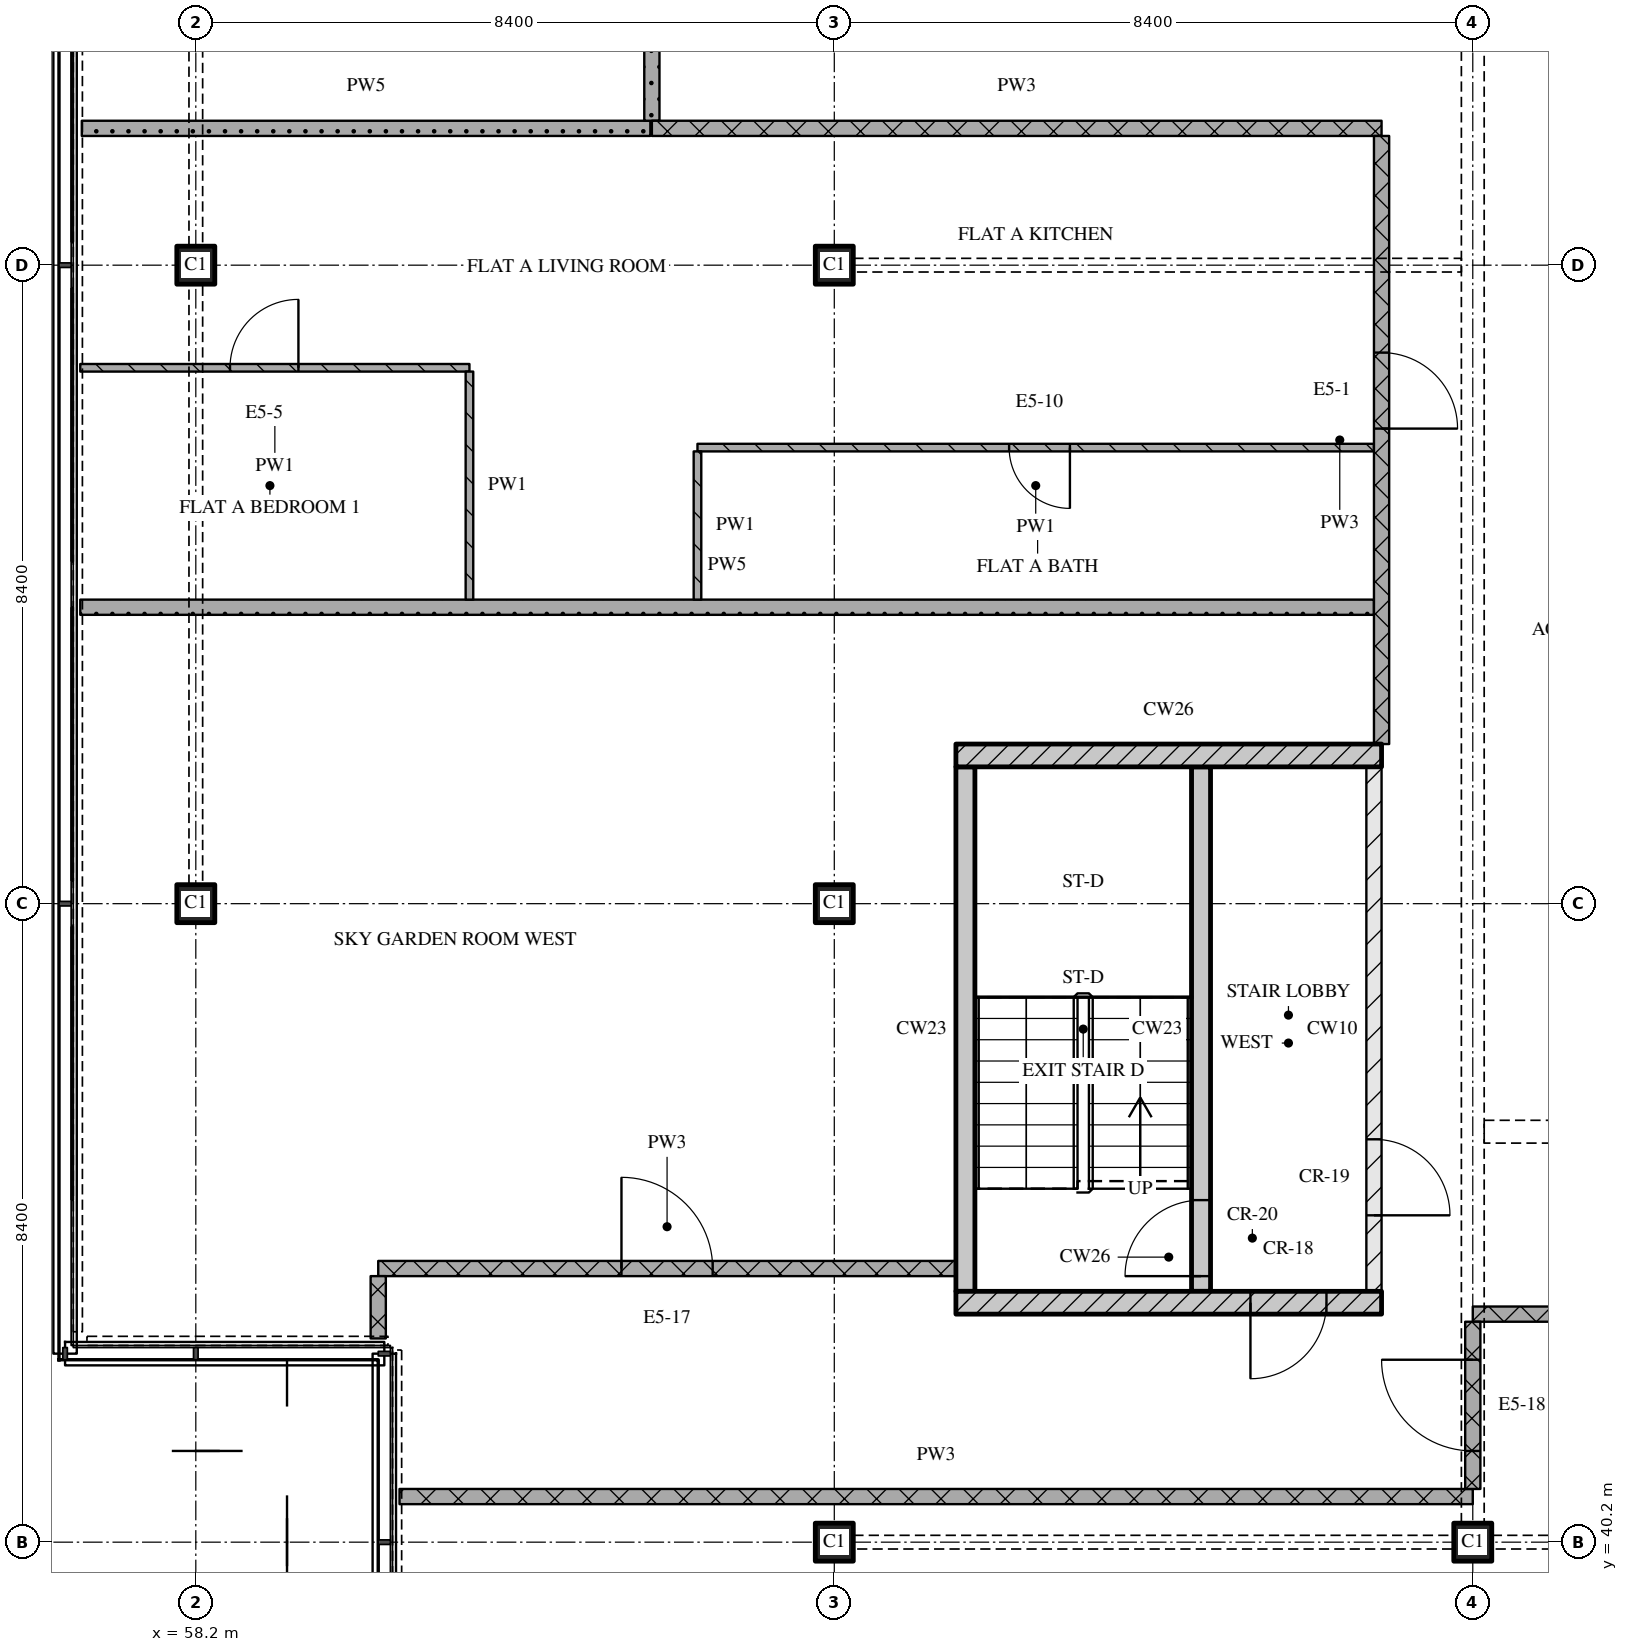
"""IFC4 building model, lengths in metres.
Left out: names, types, materials, properties, quantities, classifications, styles, units other than length and angle.
Written with IfcOpenShell. Run it as: python <this file> out.ifc"""

import sys

from ifc_helpers import new_model, si_unit, direction, frame, frame_2d, origin, origin_2d, place, context, subcontext, project, spatial, rectangle, extrude, element, fill, save


model = new_model("IFC4")
c1 = context("Model", 3, precision=1e-05, world=origin(), true_north=direction((0.0, 1.0)))
c2 = subcontext(c1, "Body", "Model", "MODEL_VIEW")
j1 = project(units=[si_unit("LENGTHUNIT", "METRE"), si_unit("PLANEANGLEUNIT", "RADIAN")], contexts=[c1])
p1 = place(None, origin())
s1 = spatial("IfcSite", under=j1, at=p1, CompositionType="ELEMENT")
p2 = place(p1, origin())
s2 = spatial("IfcBuilding", under=s1, at=p2, CompositionType="ELEMENT")
p3 = place(p2, frame((0.0, 0.0, 295.95)))
s3 = spatial("IfcBuildingStorey", under=s2, at=p3, CompositionType="ELEMENT", Elevation=295.95)
for number, where, z_axis, x_axis in (
    (1, (58.2, 48.6, 0.0), (0.0, 0.0, 1.0), (1.0, 0.0, 0.0)),
    (2, (58.2, 57.0, 0.0), (0.0, 0.0, 1.0), (1.0, 0.0, 0.0)),
    (3, (66.6, 40.2, 0.0), (0.0, 0.0, 1.0), (1.0, 0.0, 0.0)),
    (4, (66.6, 48.6, 0.0), (0.0, 0.0, 1.0), (1.0, 0.0, 0.0)),
    (5, (66.6, 57.0, 0.0), (0.0, 0.0, 1.0), (1.0, 0.0, 0.0)),
    (6, (75.0, 40.2, 0.0), (0.0, 0.0, 1.0), (1.0, 0.0, 0.0)),
):
    element("IfcColumn", number, at=place(p3, frame(where, z_axis=z_axis, x_axis=x_axis)), inside=s3, PredefinedType="COLUMN", context=c2, shape_type="SweptSolid", body=[
        extrude(rectangle(XDim=0.5, YDim=0.5, at=origin_2d()), origin(), (0.0, 0.0, 1.0), 3.6),
    ])
p4 = place(p3, frame((68.2, 43.35, 0.0), z_axis=(0.0, 0.0, 1.0), x_axis=(1.0, 0.0, 0.0)))
e7 = element("IfcWall", 7, at=p4, inside=s3, PredefinedType="SOLIDWALL", context=c2, shape_type="SweptSolid", body=[
    extrude(rectangle(XDim=5.6, YDim=0.3, at=frame_2d((2.8, 0.0))), origin(), (0.0, 0.0, 1.0), 3.32),
])
p5 = place(p4, frame((3.875, 0.0, 0.0)))
e8 = element("IfcOpeningElement", 8, at=p5, cuts=e7, PredefinedType="OPENING", context=c2, shape_type="SweptSolid", body=[
    extrude(rectangle(XDim=1.0, YDim=2.1, at=frame_2d((0.5, 1.05))), frame((0.0, 0.16, 0.0), z_axis=(0.0, -1.0, 0.0), x_axis=(1.0, 0.0, 0.0)), (0.0, 0.0, 1.0), 0.32),
])
p6 = place(p3, frame((68.325, 43.5, 0.0), z_axis=(0.0, 0.0, 1.0), x_axis=(0.0, 1.0, 0.0)))
e9 = element("IfcWall", 9, at=p6, inside=s3, PredefinedType="SOLIDWALL", context=c2, shape_type="SweptSolid", body=[
    extrude(rectangle(XDim=6.9, YDim=0.25, at=frame_2d((3.45, 0.0))), origin(), (0.0, 0.0, 1.0), 3.32),
])
p7 = place(p3, frame((71.425, 43.5, 0.0), z_axis=(0.0, 0.0, 1.0), x_axis=(0.0, 1.0, 0.0)))
e10 = element("IfcWall", 10, at=p7, inside=s3, PredefinedType="SOLIDWALL", context=c2, shape_type="SweptSolid", body=[
    extrude(rectangle(XDim=6.9, YDim=0.25, at=frame_2d((3.45, 0.0))), origin(), (0.0, 0.0, 1.0), 3.32),
])
p8 = place(p7, frame((0.2, 0.0, 0.0)))
e11 = element("IfcOpeningElement", 11, at=p8, cuts=e10, PredefinedType="OPENING", context=c2, shape_type="SweptSolid", body=[
    extrude(rectangle(XDim=1.0, YDim=2.1, at=frame_2d((0.5, 1.05))), frame((0.0, 0.135, 0.0), z_axis=(0.0, -1.0, 0.0), x_axis=(1.0, 0.0, 0.0)), (0.0, 0.0, 1.0), 0.27),
])
p9 = place(p3, frame((73.7, 43.5, 0.0), z_axis=(0.0, 0.0, 1.0), x_axis=(0.0, 1.0, 0.0)))
e12 = element("IfcWall", 12, at=p9, inside=s3, PredefinedType="PARTITIONING", context=c2, shape_type="SweptSolid", body=[
    extrude(rectangle(XDim=6.9, YDim=0.2, at=frame_2d((3.45, 0.0))), origin(), (0.0, 0.0, 1.0), 3.32),
])
p10 = place(p9, frame((1.0, 0.0, 0.0)))
e13 = element("IfcOpeningElement", 13, at=p10, cuts=e12, PredefinedType="OPENING", context=c2, shape_type="SweptSolid", body=[
    extrude(rectangle(XDim=1.0, YDim=2.1, at=frame_2d((0.5, 1.05))), frame((0.0, 0.11, 0.0), z_axis=(0.0, -1.0, 0.0), x_axis=(1.0, 0.0, 0.0)), (0.0, 0.0, 1.0), 0.22),
])
p11 = place(p3, frame((68.2, 50.55, 0.0), z_axis=(0.0, 0.0, 1.0), x_axis=(1.0, 0.0, 0.0)))
e14 = element("IfcWall", 14, at=p11, inside=s3, PredefinedType="SOLIDWALL", context=c2, shape_type="SweptSolid", body=[
    extrude(rectangle(XDim=5.6, YDim=0.3, at=frame_2d((2.8, 0.0))), origin(), (0.0, 0.0, 1.0), 3.32),
])
p12 = place(p3, frame((60.88, 40.8, 0.0), z_axis=(0.0, 0.0, 1.0), x_axis=(1.0, 0.0, 0.0)))
e15 = element("IfcWall", 15, at=p12, inside=s3, PredefinedType="PARTITIONING", context=c2, shape_type="SweptSolid", body=[
    extrude(rectangle(XDim=14.12, YDim=0.2, at=frame_2d((7.06, 0.0))), origin(), (0.0, 0.0, 1.0), 3.32),
])
p13 = place(p3, frame((100.2, 43.2, 0.0), z_axis=(0.0, 0.0, 1.0), x_axis=(-1.0, 0.0, 0.0)))
e16 = element("IfcWall", 16, at=p13, inside=s3, PredefinedType="PARTITIONING", context=c2, shape_type="SweptSolid", body=[
    extrude(rectangle(XDim=25.2, YDim=0.2, at=frame_2d((12.6, 0.0))), origin(), (0.0, 0.0, 1.0), 3.32),
])
p14 = place(p13, frame((12.0, 0.0, 0.0)))
e17 = element("IfcOpeningElement", 17, at=p14, cuts=e16, PredefinedType="OPENING", context=c2, shape_type="SweptSolid", body=[
    extrude(rectangle(XDim=1.2, YDim=2.1, at=frame_2d((0.6, 1.05))), frame((0.0, 0.11, 0.0), z_axis=(0.0, -1.0, 0.0), x_axis=(1.0, 0.0, 0.0)), (0.0, 0.0, 1.0), 0.22),
])
p15 = place(p3, frame((60.6, 43.8, 0.0), z_axis=(0.0, 0.0, 1.0), x_axis=(1.0, 0.0, 0.0)))
e18 = element("IfcWall", 18, at=p15, inside=s3, PredefinedType="PARTITIONING", context=c2, shape_type="SweptSolid", body=[
    extrude(rectangle(XDim=7.6, YDim=0.2, at=frame_2d((3.8, 0.0))), origin(), (0.0, 0.0, 1.0), 3.32),
])
p16 = place(p15, frame((3.2, 0.0, 0.0)))
e19 = element("IfcOpeningElement", 19, at=p16, cuts=e18, PredefinedType="OPENING", context=c2, shape_type="SweptSolid", body=[
    extrude(rectangle(XDim=1.2, YDim=2.1, at=frame_2d((0.6, 1.05))), frame((0.0, 0.11, 0.0), z_axis=(0.0, -1.0, 0.0), x_axis=(1.0, 0.0, 0.0)), (0.0, 0.0, 1.0), 0.22),
])
p17 = place(p3, frame((56.68, 52.5, 0.0), z_axis=(0.0, 0.0, 1.0), x_axis=(1.0, 0.0, 0.0)))
e20 = element("IfcWall", 20, at=p17, inside=s3, PredefinedType="PARTITIONING", context=c2, shape_type="SweptSolid", body=[
    extrude(rectangle(XDim=17.02, YDim=0.2, at=frame_2d((8.51, 0.0))), origin(), (0.0, 0.0, 1.0), 3.32),
])
p18 = place(p3, frame((73.7, 54.6, 0.0), z_axis=(0.0, 0.0, 1.0), x_axis=(-1.0, 0.0, 0.0)))
e21 = element("IfcWall", 21, at=p18, inside=s3, PredefinedType="PARTITIONING", context=c2, shape_type="SweptSolid", body=[
    extrude(rectangle(XDim=8.9, YDim=0.1, at=frame_2d((4.45, 0.0))), origin(), (0.0, 0.0, 1.0), 3.32),
])
p19 = place(p18, frame((4.0, 0.0, 0.0)))
e22 = element("IfcOpeningElement", 22, at=p19, cuts=e21, PredefinedType="OPENING", context=c2, shape_type="SweptSolid", body=[
    extrude(rectangle(XDim=0.8, YDim=2.1, at=frame_2d((0.4, 1.05))), frame((0.0, 0.06, 0.0), z_axis=(0.0, -1.0, 0.0), x_axis=(1.0, 0.0, 0.0)), (0.0, 0.0, 1.0), 0.12),
])
p20 = place(p3, frame((61.8, 55.65, 0.0), z_axis=(0.0, 0.0, 1.0), x_axis=(-1.0, 0.0, 0.0)))
e23 = element("IfcWall", 23, at=p20, inside=s3, PredefinedType="PARTITIONING", context=c2, shape_type="SweptSolid", body=[
    extrude(rectangle(XDim=5.12, YDim=0.1, at=frame_2d((2.56, 0.0))), origin(), (0.0, 0.0, 1.0), 3.32),
])
p21 = place(p20, frame((2.25, 0.0, 0.0)))
e24 = element("IfcOpeningElement", 24, at=p21, cuts=e23, PredefinedType="OPENING", context=c2, shape_type="SweptSolid", body=[
    extrude(rectangle(XDim=0.9, YDim=2.1, at=frame_2d((0.45, 1.05))), frame((0.0, 0.06, 0.0), z_axis=(0.0, -1.0, 0.0), x_axis=(1.0, 0.0, 0.0)), (0.0, 0.0, 1.0), 0.12),
])
p22 = place(p3, frame((64.2, 58.8, 0.0), z_axis=(0.0, 0.0, 1.0), x_axis=(1.0, 0.0, 0.0)))
e25 = element("IfcWall", 25, at=p22, inside=s3, PredefinedType="PARTITIONING", context=c2, shape_type="SweptSolid", body=[
    extrude(rectangle(XDim=9.6, YDim=0.2, at=frame_2d((4.8, 0.0))), origin(), (0.0, 0.0, 1.0), 3.32),
])
p23 = place(p3, frame((56.7, 58.8, 0.0), z_axis=(0.0, 0.0, 1.0), x_axis=(1.0, 0.0, 0.0)))
e26 = element("IfcWall", 26, at=p23, inside=s3, PredefinedType="PARTITIONING", context=c2, shape_type="SweptSolid", body=[
    extrude(rectangle(XDim=7.48, YDim=0.2, at=frame_2d((3.74, 0.0))), origin(), (0.0, 0.0, 1.0), 3.32),
])
p24 = place(p3, frame((60.6, 43.7, 0.0), z_axis=(0.0, 0.0, 1.0), x_axis=(0.0, -1.0, 0.0)))
e27 = element("IfcWall", 27, at=p24, inside=s3, PredefinedType="PARTITIONING", context=c2, shape_type="SweptSolid", body=[
    extrude(rectangle(XDim=0.82, YDim=0.2, at=frame_2d((0.41, 0.0))), origin(), (0.0, 0.0, 1.0), 3.32),
])
p25 = place(p3, frame((61.8, 55.6, 0.0), z_axis=(0.0, 0.0, 1.0), x_axis=(0.0, -1.0, 0.0)))
e28 = element("IfcWall", 28, at=p25, inside=s3, PredefinedType="PARTITIONING", context=c2, shape_type="SweptSolid", body=[
    extrude(rectangle(XDim=3.0, YDim=0.1, at=frame_2d((1.5, 0.0))), origin(), (0.0, 0.0, 1.0), 3.32),
])
p26 = place(p3, frame((64.2, 61.1, 0.0), z_axis=(0.0, 0.0, 1.0), x_axis=(0.0, -1.0, 0.0)))
e29 = element("IfcWall", 29, at=p26, inside=s3, PredefinedType="PARTITIONING", context=c2, shape_type="SweptSolid", body=[
    extrude(rectangle(XDim=2.2, YDim=0.2, at=frame_2d((1.1, 0.0))), origin(), (0.0, 0.0, 1.0), 3.32),
])
p27 = place(p3, frame((64.8, 54.55, 0.0), z_axis=(0.0, 0.0, 1.0), x_axis=(0.0, -1.0, 0.0)))
e30 = element("IfcWall", 30, at=p27, inside=s3, PredefinedType="PARTITIONING", context=c2, shape_type="SweptSolid", body=[
    extrude(rectangle(XDim=1.95, YDim=0.1, at=frame_2d((0.975, 0.0))), origin(), (0.0, 0.0, 1.0), 3.32),
])
p28 = place(p3, frame((73.8, 50.7, 0.0), z_axis=(0.0, 0.0, 1.0), x_axis=(0.0, 1.0, 0.0)))
e31 = element("IfcWall", 31, at=p28, inside=s3, PredefinedType="PARTITIONING", context=c2, shape_type="SweptSolid", body=[
    extrude(rectangle(XDim=8.0, YDim=0.2, at=frame_2d((4.0, 0.0))), origin(), (0.0, 0.0, 1.0), 3.32),
])
p29 = place(p28, frame((4.15, 0.0, 0.0)))
e32 = element("IfcOpeningElement", 32, at=p29, cuts=e31, PredefinedType="OPENING", context=c2, shape_type="SweptSolid", body=[
    extrude(rectangle(XDim=1.0, YDim=2.1, at=frame_2d((0.5, 1.05))), frame((0.0, 0.11, 0.0), z_axis=(0.0, -1.0, 0.0), x_axis=(1.0, 0.0, 0.0)), (0.0, 0.0, 1.0), 0.22),
])
p30 = place(p3, frame((75.0, 43.1, 0.0), z_axis=(0.0, 0.0, 1.0), x_axis=(0.0, -1.0, 0.0)))
e33 = element("IfcWall", 33, at=p30, inside=s3, PredefinedType="PARTITIONING", context=c2, shape_type="SweptSolid", body=[
    extrude(rectangle(XDim=2.2, YDim=0.2, at=frame_2d((1.1, 0.0))), origin(), (0.0, 0.0, 1.0), 2.53),
])
p31 = place(p30, frame((0.5, 0.0, 0.0)))
e34 = element("IfcOpeningElement", 34, at=p31, cuts=e33, PredefinedType="OPENING", context=c2, shape_type="SweptSolid", body=[
    extrude(rectangle(XDim=1.2, YDim=2.1, at=frame_2d((0.6, 1.05))), frame((0.0, 0.11, 0.0), z_axis=(0.0, -1.0, 0.0), x_axis=(1.0, 0.0, 0.0)), (0.0, 0.0, 1.0), 0.22),
])
p32 = place(p5, origin())
e35 = element("IfcDoor", 35, at=p32, inside=s3, OperationType="SINGLE_SWING_RIGHT", PredefinedType="DOOR", context=c2, shape_type="SweptSolid", body=[
    extrude(rectangle(XDim=1.0, YDim=2.1, at=frame_2d((0.5, 1.05))), frame((0.0, 0.025, 0.0), z_axis=(0.0, -1.0, 0.0), x_axis=(1.0, 0.0, 0.0)), (0.0, 0.0, 1.0), 0.05),
])
fill(e8, e35)
p33 = place(p8, origin())
e36 = element("IfcDoor", 36, at=p33, inside=s3, OperationType="SINGLE_SWING_LEFT", PredefinedType="DOOR", context=c2, shape_type="SweptSolid", body=[
    extrude(rectangle(XDim=1.0, YDim=2.1, at=frame_2d((0.5, 1.05))), frame((0.0, 0.025, 0.0), z_axis=(0.0, -1.0, 0.0), x_axis=(1.0, 0.0, 0.0)), (0.0, 0.0, 1.0), 0.05),
])
fill(e11, e36)
p34 = place(p10, origin())
e37 = element("IfcDoor", 37, at=p34, inside=s3, OperationType="SINGLE_SWING_RIGHT", PredefinedType="DOOR", context=c2, shape_type="SweptSolid", body=[
    extrude(rectangle(XDim=1.0, YDim=2.1, at=frame_2d((0.5, 1.05))), frame((0.0, 0.025, 0.0), z_axis=(0.0, -1.0, 0.0), x_axis=(1.0, 0.0, 0.0)), (0.0, 0.0, 1.0), 0.05),
])
fill(e13, e37)
p35 = place(p16, origin())
e38 = element("IfcDoor", 38, at=p35, inside=s3, OperationType="SINGLE_SWING_LEFT", PredefinedType="DOOR", context=c2, shape_type="SweptSolid", body=[
    extrude(rectangle(XDim=1.2, YDim=2.1, at=frame_2d((0.6, 1.05))), frame((0.0, 0.025, 0.0), z_axis=(0.0, -1.0, 0.0), x_axis=(1.0, 0.0, 0.0)), (0.0, 0.0, 1.0), 0.05),
])
fill(e19, e38)
p36 = place(p19, origin())
e39 = element("IfcDoor", 39, at=p36, inside=s3, OperationType="SINGLE_SWING_LEFT", PredefinedType="DOOR", context=c2, shape_type="SweptSolid", body=[
    extrude(rectangle(XDim=0.8, YDim=2.1, at=frame_2d((0.4, 1.05))), frame((0.0, 0.025, 0.0), z_axis=(0.0, -1.0, 0.0), x_axis=(1.0, 0.0, 0.0)), (0.0, 0.0, 1.0), 0.05),
])
fill(e22, e39)
p37 = place(p21, origin())
e40 = element("IfcDoor", 40, at=p37, inside=s3, OperationType="SINGLE_SWING_RIGHT", PredefinedType="DOOR", context=c2, shape_type="SweptSolid", body=[
    extrude(rectangle(XDim=0.9, YDim=2.1, at=frame_2d((0.45, 1.05))), frame((0.0, 0.025, 0.0), z_axis=(0.0, -1.0, 0.0), x_axis=(1.0, 0.0, 0.0)), (0.0, 0.0, 1.0), 0.05),
])
fill(e24, e40)
p38 = place(p29, origin())
e41 = element("IfcDoor", 41, at=p38, inside=s3, OperationType="SINGLE_SWING_RIGHT", PredefinedType="DOOR", context=c2, shape_type="SweptSolid", body=[
    extrude(rectangle(XDim=1.0, YDim=2.1, at=frame_2d((0.5, 1.05))), frame((0.0, 0.025, 0.0), z_axis=(0.0, -1.0, 0.0), x_axis=(1.0, 0.0, 0.0)), (0.0, 0.0, 1.0), 0.05),
])
fill(e32, e41)
p39 = place(p31, origin())
e42 = element("IfcDoor", 42, at=p39, inside=s3, OperationType="SINGLE_SWING_RIGHT", PredefinedType="DOOR", context=c2, shape_type="SweptSolid", body=[
    extrude(rectangle(XDim=1.2, YDim=2.1, at=frame_2d((0.6, 1.05))), frame((0.0, 0.025, 0.0), z_axis=(0.0, -1.0, 0.0), x_axis=(1.0, 0.0, 0.0)), (0.0, 0.0, 1.0), 0.05),
])
fill(e34, e42)
save(model, sys.argv[1])
